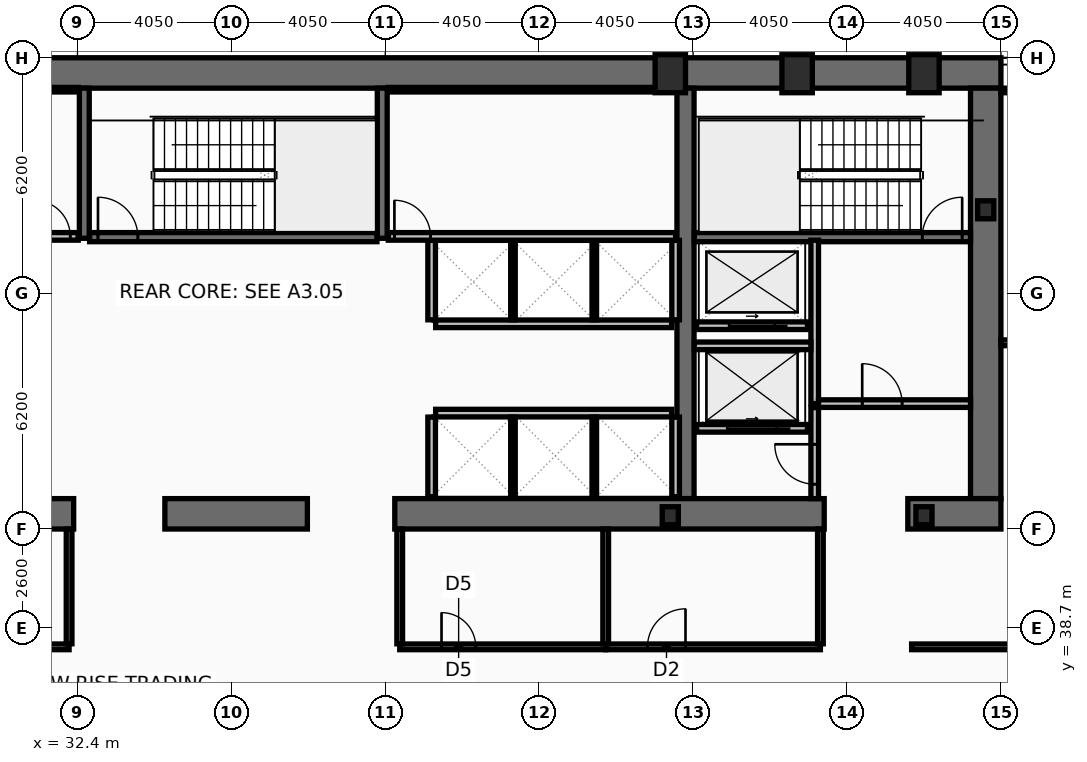
"""IFC4 building model, lengths in metres.
Left out: names, types, materials, properties, quantities, classifications, styles, units other than length and angle.
Written with IfcOpenShell. Run it as: python <this file> out.ifc"""

import sys

from ifc_helpers import new_model, si_unit, direction, frame, frame_2d, origin, origin_2d, place, context, subcontext, project, spatial, rectangle, hollow_rectangle, i_section, extrude, element, fill, save


model = new_model("IFC4")
c1 = context("Model", 3, precision=1e-05, world=origin(), true_north=direction((0.0, 1.0)))
c2 = subcontext(c1, "Body", "Model", "MODEL_VIEW")
j1 = project(units=[si_unit("LENGTHUNIT", "METRE"), si_unit("PLANEANGLEUNIT", "RADIAN")], contexts=[c1])
p1 = place(None, origin())
s1 = spatial("IfcSite", under=j1, at=p1, CompositionType="ELEMENT")
p2 = place(p1, origin())
s2 = spatial("IfcBuilding", under=s1, at=p2, CompositionType="ELEMENT")
p3 = place(p2, frame((0.0, 0.0, 49.8)))
s3 = spatial("IfcBuildingStorey", under=s2, at=p3, CompositionType="ELEMENT", Elevation=49.8)
p4 = place(p3, frame((16.2, 53.3, 0.0), z_axis=(0.0, 0.0, 1.0), x_axis=(1.0, 0.0, 0.0)))
e1 = element("IfcWall", 1, at=p4, inside=s3, PredefinedType="SHEAR", context=c2, shape_type="SweptSolid", body=[
    extrude(rectangle(XDim=40.5, YDim=0.8, at=frame_2d((20.25, 0.0))), origin(), (0.0, 0.0, 1.0), 3.82),
])
p5 = place(p3, frame((56.3, 52.9, 0.0), z_axis=(0.0, 0.0, 1.0), x_axis=(0.0, -1.0, 0.0)))
e2 = element("IfcWall", 2, at=p5, inside=s3, PredefinedType="SHEAR", context=c2, shape_type="SweptSolid", body=[
    extrude(rectangle(XDim=10.8, YDim=0.8, at=frame_2d((5.4, 0.0))), origin(), (0.0, 0.0, 1.0), 3.82),
])
p6 = place(p3, frame((48.4, 42.1, 0.0), z_axis=(0.0, 0.0, 1.0), x_axis=(0.0, 1.0, 0.0)))
e3 = element("IfcWall", 3, at=p6, inside=s3, PredefinedType="SHEAR", context=c2, shape_type="SweptSolid", body=[
    extrude(rectangle(XDim=10.8, YDim=0.45, at=frame_2d((5.4, 0.0))), origin(), (0.0, 0.0, 1.0), 3.82),
])
p7 = place(p3, frame((32.3, 41.7, 0.0), z_axis=(0.0, 0.0, 1.0), x_axis=(-1.0, 0.0, 0.0)))
e4 = element("IfcWall", 4, at=p7, inside=s3, PredefinedType="SHEAR", context=c2, shape_type="SweptSolid", body=[
    extrude(rectangle(XDim=11.45, YDim=0.8, at=frame_2d((5.725, 0.0))), origin(), (0.0, 0.0, 1.0), 3.82),
])
p8 = place(p3, frame((38.45, 41.7, 0.0), z_axis=(0.0, 0.0, 1.0), x_axis=(-1.0, 0.0, 0.0)))
e5 = element("IfcWall", 5, at=p8, inside=s3, PredefinedType="SHEAR", context=c2, shape_type="SweptSolid", body=[
    extrude(rectangle(XDim=3.75, YDim=0.8, at=frame_2d((1.875, 0.0))), origin(), (0.0, 0.0, 1.0), 3.82),
])
p9 = place(p3, frame((52.05, 41.7, 0.0), z_axis=(0.0, 0.0, 1.0), x_axis=(-1.0, 0.0, 0.0)))
e6 = element("IfcWall", 6, at=p9, inside=s3, PredefinedType="SHEAR", context=c2, shape_type="SweptSolid", body=[
    extrude(rectangle(XDim=11.3, YDim=0.8, at=frame_2d((5.65, 0.0))), origin(), (0.0, 0.0, 1.0), 3.82),
])
p10 = place(p3, frame((56.7, 41.7, 0.0), z_axis=(0.0, 0.0, 1.0), x_axis=(-1.0, 0.0, 0.0)))
e7 = element("IfcWall", 7, at=p10, inside=s3, PredefinedType="SHEAR", context=c2, shape_type="SweptSolid", body=[
    extrude(rectangle(XDim=2.45, YDim=0.8, at=frame_2d((1.225, 0.0))), origin(), (0.0, 0.0, 1.0), 3.82),
])
for number, where, z_axis, x_axis in (
    (8, (32.58, 48.95, 0.0), (0.0, 0.0, 1.0), (0.0, 1.0, 0.0)),
    (9, (40.42, 48.95, 0.0), (0.0, 0.0, 1.0), (0.0, 1.0, 0.0)),
):
    element("IfcWall", number, at=place(p3, frame(where, z_axis=z_axis, x_axis=x_axis)), inside=s3, PredefinedType="SHEAR", context=c2, shape_type="SweptSolid", body=[
        extrude(rectangle(XDim=3.95, YDim=0.26, at=frame_2d((1.975, 0.0))), origin(), (0.0, 0.0, 1.0), 3.82),
    ])
p11 = place(p3, frame((48.63, 48.98, 0.0), z_axis=(0.0, 0.0, 1.0), x_axis=(1.0, 0.0, 0.0)))
e10 = element("IfcWall", 10, at=p11, inside=s3, PredefinedType="SHEAR", context=c2, shape_type="SweptSolid", body=[
    extrude(rectangle(XDim=7.27, YDim=0.24, at=frame_2d((3.635, 0.0))), origin(), (0.0, 0.0, 1.0), 3.82),
])
p12 = place(p11, frame((6.0, 0.0, 0.0)))
e11 = element("IfcOpeningElement", 11, at=p12, cuts=e10, PredefinedType="OPENING", context=c2, shape_type="SweptSolid", body=[
    extrude(rectangle(XDim=1.05, YDim=2.15, at=frame_2d((0.525, 1.075))), frame((0.0, 0.13, 0.0), z_axis=(0.0, -1.0, 0.0), x_axis=(1.0, 0.0, 0.0)), (0.0, 0.0, 1.0), 0.26),
])
p13 = place(p3, frame((32.72, 48.98, 0.0), z_axis=(0.0, 0.0, 1.0), x_axis=(1.0, 0.0, 0.0)))
e12 = element("IfcWall", 12, at=p13, inside=s3, PredefinedType="SHEAR", context=c2, shape_type="SweptSolid", body=[
    extrude(rectangle(XDim=7.56, YDim=0.24, at=frame_2d((3.78, 0.0))), origin(), (0.0, 0.0, 1.0), 3.82),
])
p14 = place(p13, frame((0.22, 0.0, 0.0)))
e13 = element("IfcOpeningElement", 13, at=p14, cuts=e12, PredefinedType="OPENING", context=c2, shape_type="SweptSolid", body=[
    extrude(rectangle(XDim=1.05, YDim=2.15, at=frame_2d((0.525, 1.075))), frame((0.0, 0.13, 0.0), z_axis=(0.0, -1.0, 0.0), x_axis=(1.0, 0.0, 0.0)), (0.0, 0.0, 1.0), 0.26),
])
for number, where, z_axis, x_axis in (
    (14, (48.0, 53.28, 0.0), (0.0, 0.0, 1.0), (1.0, 0.0, 0.0)),
    (15, (51.337, 53.28, 0.0), (0.0, 0.0, 1.0), (1.0, 0.0, 0.0)),
    (16, (54.675, 53.28, 0.0), (0.0, 0.0, 1.0), (1.0, 0.0, 0.0)),
):
    element("IfcColumn", number, at=place(p3, frame(where, z_axis=z_axis, x_axis=x_axis)), inside=s3, PredefinedType="COLUMN", context=c2, shape_type="SweptSolid", body=[
        extrude(hollow_rectangle(XDim=0.8, YDim=1.0, WallThickness=0.055, at=origin_2d()), origin(), (0.0, 0.0, 1.0), 4.0),
    ])
for number, where, z_axis, x_axis in (
    (17, (56.3, 49.7, 0.0), (0.0, 0.0, 1.0), (1.0, 0.0, 0.0)),
    (18, (48.0, 41.65, 0.0), (0.0, 0.0, 1.0), (1.0, 0.0, 0.0)),
    (19, (54.675, 41.65, 0.0), (0.0, 0.0, 1.0), (1.0, 0.0, 0.0)),
):
    element("IfcColumn", number, at=place(p3, frame(where, z_axis=z_axis, x_axis=x_axis)), inside=s3, PredefinedType="COLUMN", context=c2, shape_type="SweptSolid", body=[
        extrude(i_section(OverallWidth=0.424, OverallDepth=0.474, WebThickness=0.048, FlangeThickness=0.077, at=origin_2d()), origin(), (0.0, 0.0, 1.0), 4.0),
    ])
p15 = place(p3, frame((51.61, 43.95, 0.0), z_axis=(0.0, 0.0, 1.0), x_axis=(-1.0, 0.0, 0.0)))
e20 = element("IfcWall", 20, at=p15, inside=s3, PredefinedType="PARTITIONING", context=c2, shape_type="SweptSolid", body=[
    extrude(rectangle(XDim=2.92, YDim=0.2, at=frame_2d((1.46, 0.0))), origin(), (0.0, 0.0, 1.0), 3.82),
])
p16 = place(p15, frame((0.81, 0.0, 0.0)))
e21 = element("IfcOpeningElement", 21, at=p16, cuts=e20, PredefinedType="OPENING", context=c2, shape_type="SweptSolid", body=[
    extrude(rectangle(XDim=1.3, YDim=2.18, at=frame_2d((0.65, 1.09))), frame((0.0, 0.11, 0.0), z_axis=(0.0, -1.0, 0.0), x_axis=(1.0, 0.0, 0.0)), (0.0, 0.0, 1.0), 0.22),
])
p17 = place(p3, frame((51.61, 46.65, 0.0), z_axis=(0.0, 0.0, 1.0), x_axis=(-1.0, 0.0, 0.0)))
e22 = element("IfcWall", 22, at=p17, inside=s3, PredefinedType="PARTITIONING", context=c2, shape_type="SweptSolid", body=[
    extrude(rectangle(XDim=2.92, YDim=0.2, at=frame_2d((1.46, 0.0))), origin(), (0.0, 0.0, 1.0), 3.82),
])
p18 = place(p17, frame((0.86, 0.0, 0.0)))
e23 = element("IfcOpeningElement", 23, at=p18, cuts=e22, PredefinedType="OPENING", context=c2, shape_type="SweptSolid", body=[
    extrude(rectangle(XDim=1.2, YDim=2.18, at=frame_2d((0.6, 1.09))), frame((0.0, 0.11, 0.0), z_axis=(0.0, -1.0, 0.0), x_axis=(1.0, 0.0, 0.0)), (0.0, 0.0, 1.0), 0.22),
])
p19 = place(p3, frame((51.8, 44.6, 0.0), z_axis=(0.0, 0.0, 1.0), x_axis=(0.0, 1.0, 0.0)))
e24 = element("IfcWall", 24, at=p19, inside=s3, PredefinedType="PARTITIONING", context=c2, shape_type="SweptSolid", body=[
    extrude(rectangle(XDim=4.3, YDim=0.2, at=frame_2d((2.15, 0.0))), origin(), (0.0, 0.0, 1.0), 3.82),
])
p20 = place(p3, frame((51.9, 44.6, 0.0), z_axis=(0.0, 0.0, 1.0), x_axis=(1.0, 0.0, 0.0)))
e25 = element("IfcWall", 25, at=p20, inside=s3, PredefinedType="PARTITIONING", context=c2, shape_type="SweptSolid", body=[
    extrude(rectangle(XDim=4.0, YDim=0.2, at=frame_2d((2.0, 0.0))), origin(), (0.0, 0.0, 1.0), 3.82),
])
p21 = place(p20, frame((1.15, 0.0, 0.0)))
e26 = element("IfcOpeningElement", 26, at=p21, cuts=e25, PredefinedType="OPENING", context=c2, shape_type="SweptSolid", body=[
    extrude(rectangle(XDim=1.05, YDim=2.15, at=frame_2d((0.525, 1.075))), frame((0.0, 0.11, 0.0), z_axis=(0.0, -1.0, 0.0), x_axis=(1.0, 0.0, 0.0)), (0.0, 0.0, 1.0), 0.22),
])
p22 = place(p3, frame((48.63, 46.12, 0.0), z_axis=(0.0, 0.0, 1.0), x_axis=(1.0, 0.0, 0.0)))
e27 = element("IfcWall", 27, at=p22, inside=s3, PredefinedType="PARTITIONING", context=c2, shape_type="SweptSolid", body=[
    extrude(rectangle(XDim=3.07, YDim=0.2, at=frame_2d((1.535, 0.0))), origin(), (0.0, 0.0, 1.0), 3.82),
])
p23 = place(p3, frame((51.8, 42.1, 0.0), z_axis=(0.0, 0.0, 1.0), x_axis=(0.0, 1.0, 0.0)))
e28 = element("IfcWall", 28, at=p23, inside=s3, PredefinedType="PARTITIONING", context=c2, shape_type="SweptSolid", body=[
    extrude(rectangle(XDim=2.395, YDim=0.2, at=frame_2d((1.198, 0.0))), origin(), (0.0, 0.0, 1.0), 3.82),
])
p24 = place(p23, frame((0.38, 0.0, 0.0)))
e29 = element("IfcOpeningElement", 29, at=p24, cuts=e28, PredefinedType="OPENING", context=c2, shape_type="SweptSolid", body=[
    extrude(rectangle(XDim=1.05, YDim=2.15, at=frame_2d((0.525, 1.075))), frame((0.0, 0.11, 0.0), z_axis=(0.0, -1.0, 0.0), x_axis=(1.0, 0.0, 0.0)), (0.0, 0.0, 1.0), 0.22),
])
p25 = place(p3, frame((41.825, 46.7, 0.0), z_axis=(0.0, 0.0, 1.0), x_axis=(1.0, 0.0, 0.0)))
e30 = element("IfcWall", 30, at=p25, inside=s3, PredefinedType="PARTITIONING", context=c2, shape_type="SweptSolid", body=[
    extrude(rectangle(XDim=6.21, YDim=0.2, at=frame_2d((3.105, 0.0))), origin(), (0.0, 0.0, 1.0), 3.82),
])
for number, where, z_axis, x_axis in (
    (31, (41.72, 46.805, 0.0), (0.0, 0.0, 1.0), (0.0, 1.0, 0.0)),
    (32, (48.14, 46.805, 0.0), (0.0, 0.0, 1.0), (0.0, 1.0, 0.0)),
):
    element("IfcWall", number, at=place(p3, frame(where, z_axis=z_axis, x_axis=x_axis)), inside=s3, PredefinedType="PARTITIONING", context=c2, shape_type="SweptSolid", body=[
        extrude(rectangle(XDim=2.09, YDim=0.2, at=frame_2d((1.045, 0.0))), origin(), (0.0, 0.0, 1.0), 3.82),
    ])
for number, where, z_axis, x_axis in (
    (33, (43.86, 46.805, 0.0), (0.0, 0.0, 1.0), (0.0, 1.0, 0.0)),
    (34, (46.0, 46.805, 0.0), (0.0, 0.0, 1.0), (0.0, 1.0, 0.0)),
):
    element("IfcWall", number, at=place(p3, frame(where, z_axis=z_axis, x_axis=x_axis)), inside=s3, PredefinedType="PARTITIONING", context=c2, shape_type="SweptSolid", body=[
        extrude(rectangle(XDim=2.09, YDim=0.12, at=frame_2d((1.045, 0.0))), origin(), (0.0, 0.0, 1.0), 3.82),
    ])
p26 = place(p3, frame((41.825, 44.35, 0.0), z_axis=(0.0, 0.0, 1.0), x_axis=(1.0, 0.0, 0.0)))
e35 = element("IfcWall", 35, at=p26, inside=s3, PredefinedType="PARTITIONING", context=c2, shape_type="SweptSolid", body=[
    extrude(rectangle(XDim=6.21, YDim=0.2, at=frame_2d((3.105, 0.0))), origin(), (0.0, 0.0, 1.0), 3.82),
])
for number, where, z_axis, x_axis in (
    (36, (41.72, 42.15, 0.0), (0.0, 0.0, 1.0), (0.0, 1.0, 0.0)),
    (37, (48.14, 42.15, 0.0), (0.0, 0.0, 1.0), (0.0, 1.0, 0.0)),
):
    element("IfcWall", number, at=place(p3, frame(where, z_axis=z_axis, x_axis=x_axis)), inside=s3, PredefinedType="PARTITIONING", context=c2, shape_type="SweptSolid", body=[
        extrude(rectangle(XDim=2.095, YDim=0.2, at=frame_2d((1.048, 0.0))), origin(), (0.0, 0.0, 1.0), 3.82),
    ])
for number, where, z_axis, x_axis in (
    (38, (43.86, 42.15, 0.0), (0.0, 0.0, 1.0), (0.0, 1.0, 0.0)),
    (39, (46.0, 42.15, 0.0), (0.0, 0.0, 1.0), (0.0, 1.0, 0.0)),
):
    element("IfcWall", number, at=place(p3, frame(where, z_axis=z_axis, x_axis=x_axis)), inside=s3, PredefinedType="PARTITIONING", context=c2, shape_type="SweptSolid", body=[
        extrude(rectangle(XDim=2.095, YDim=0.12, at=frame_2d((1.048, 0.0))), origin(), (0.0, 0.0, 1.0), 3.82),
    ])
p27 = place(p3, frame((24.7, 52.86, 0.0), z_axis=(0.0, 0.0, 1.0), x_axis=(1.0, 0.0, 0.0)))
e40 = element("IfcWall", 40, at=p27, inside=s3, PredefinedType="PARTITIONING", context=c2, shape_type="SweptSolid", body=[
    extrude(rectangle(XDim=7.72, YDim=0.12, at=frame_2d((3.86, 0.0))), origin(), (0.0, 0.0, 1.0), 3.82),
])
p28 = place(p3, frame((24.7, 49.0, 0.0), z_axis=(0.0, 0.0, 1.0), x_axis=(1.0, 0.0, 0.0)))
e41 = element("IfcWall", 41, at=p28, inside=s3, PredefinedType="PARTITIONING", context=c2, shape_type="SweptSolid", body=[
    extrude(rectangle(XDim=7.72, YDim=0.2, at=frame_2d((3.86, 0.0))), origin(), (0.0, 0.0, 1.0), 3.82),
])
p29 = place(p28, frame((6.56, 0.0, 0.0)))
e42 = element("IfcOpeningElement", 42, at=p29, cuts=e41, PredefinedType="OPENING", context=c2, shape_type="SweptSolid", body=[
    extrude(rectangle(XDim=0.95, YDim=2.1, at=frame_2d((0.475, 1.05))), frame((0.0, 0.11, 0.0), z_axis=(0.0, -1.0, 0.0), x_axis=(1.0, 0.0, 0.0)), (0.0, 0.0, 1.0), 0.22),
])
p30 = place(p3, frame((40.58, 52.86, 0.0), z_axis=(0.0, 0.0, 1.0), x_axis=(1.0, 0.0, 0.0)))
e43 = element("IfcWall", 43, at=p30, inside=s3, PredefinedType="PARTITIONING", context=c2, shape_type="SweptSolid", body=[
    extrude(rectangle(XDim=7.56, YDim=0.12, at=frame_2d((3.78, 0.0))), origin(), (0.0, 0.0, 1.0), 3.82),
])
p31 = place(p3, frame((40.58, 49.0, 0.0), z_axis=(0.0, 0.0, 1.0), x_axis=(1.0, 0.0, 0.0)))
e44 = element("IfcWall", 44, at=p31, inside=s3, PredefinedType="PARTITIONING", context=c2, shape_type="SweptSolid", body=[
    extrude(rectangle(XDim=7.56, YDim=0.2, at=frame_2d((3.78, 0.0))), origin(), (0.0, 0.0, 1.0), 3.82),
])
p32 = place(p31, frame((0.16, 0.0, 0.0)))
e45 = element("IfcOpeningElement", 45, at=p32, cuts=e44, PredefinedType="OPENING", context=c2, shape_type="SweptSolid", body=[
    extrude(rectangle(XDim=0.95, YDim=2.1, at=frame_2d((0.475, 1.05))), frame((0.0, 0.11, 0.0), z_axis=(0.0, -1.0, 0.0), x_axis=(1.0, 0.0, 0.0)), (0.0, 0.0, 1.0), 0.22),
])
p33 = place(p3, frame((28.8, 38.2, 0.0), z_axis=(0.0, 0.0, 1.0), x_axis=(1.0, 0.0, 0.0)))
e46 = element("IfcWall", 46, at=p33, inside=s3, PredefinedType="PARTITIONING", context=c2, shape_type="SweptSolid", body=[
    extrude(rectangle(XDim=3.38, YDim=0.15, at=frame_2d((1.69, 0.0))), origin(), (0.0, 0.0, 1.0), 3.01),
])
p34 = place(p33, frame((0.7, 0.0, 0.0)))
e47 = element("IfcOpeningElement", 47, at=p34, cuts=e46, PredefinedType="OPENING", context=c2, shape_type="SweptSolid", body=[
    extrude(rectangle(XDim=0.95, YDim=2.05, at=frame_2d((0.475, 1.025))), frame((0.0, 0.085, 0.0), z_axis=(0.0, -1.0, 0.0), x_axis=(1.0, 0.0, 0.0)), (0.0, 0.0, 1.0), 0.17),
])
p35 = place(p3, frame((32.18, 38.28, 0.0), z_axis=(0.0, 0.0, 1.0), x_axis=(0.0, 1.0, 0.0)))
e48 = element("IfcWall", 48, at=p35, inside=s3, PredefinedType="PARTITIONING", context=c2, shape_type="SweptSolid", body=[
    extrude(rectangle(XDim=3.02, YDim=0.15, at=frame_2d((1.51, 0.0))), origin(), (0.0, 0.0, 1.0), 3.82),
])
p36 = place(p3, frame((40.88, 38.2, 0.0), z_axis=(0.0, 0.0, 1.0), x_axis=(1.0, 0.0, 0.0)))
e49 = element("IfcWall", 49, at=p36, inside=s3, PredefinedType="PARTITIONING", context=c2, shape_type="SweptSolid", body=[
    extrude(rectangle(XDim=5.42, YDim=0.15, at=frame_2d((2.71, 0.0))), origin(), (0.0, 0.0, 1.0), 3.01),
])
p37 = place(p36, frame((1.1, 0.0, 0.0)))
e50 = element("IfcOpeningElement", 50, at=p37, cuts=e49, PredefinedType="OPENING", context=c2, shape_type="SweptSolid", body=[
    extrude(rectangle(XDim=0.9, YDim=2.05, at=frame_2d((0.45, 1.025))), frame((0.0, 0.085, 0.0), z_axis=(0.0, -1.0, 0.0), x_axis=(1.0, 0.0, 0.0)), (0.0, 0.0, 1.0), 0.17),
])
p38 = place(p3, frame((46.3, 38.2, 0.0), z_axis=(0.0, 0.0, 1.0), x_axis=(1.0, 0.0, 0.0)))
e51 = element("IfcWall", 51, at=p38, inside=s3, PredefinedType="PARTITIONING", context=c2, shape_type="SweptSolid", body=[
    extrude(rectangle(XDim=5.65, YDim=0.15, at=frame_2d((2.825, 0.0))), origin(), (0.0, 0.0, 1.0), 3.01),
])
p39 = place(p38, frame((1.1, 0.0, 0.0)))
e52 = element("IfcOpeningElement", 52, at=p39, cuts=e51, PredefinedType="OPENING", context=c2, shape_type="SweptSolid", body=[
    extrude(rectangle(XDim=1.0, YDim=2.05, at=frame_2d((0.5, 1.025))), frame((0.0, 0.085, 0.0), z_axis=(0.0, -1.0, 0.0), x_axis=(1.0, 0.0, 0.0)), (0.0, 0.0, 1.0), 0.17),
])
for number, where, z_axis, x_axis in (
    (53, (40.88, 38.28, 0.0), (0.0, 0.0, 1.0), (0.0, 1.0, 0.0)),
    (54, (46.3, 38.28, 0.0), (0.0, 0.0, 1.0), (0.0, 1.0, 0.0)),
    (55, (51.95, 38.28, 0.0), (0.0, 0.0, 1.0), (0.0, 1.0, 0.0)),
):
    element("IfcWall", number, at=place(p3, frame(where, z_axis=z_axis, x_axis=x_axis)), inside=s3, PredefinedType="PARTITIONING", context=c2, shape_type="SweptSolid", body=[
        extrude(rectangle(XDim=3.02, YDim=0.15, at=frame_2d((1.51, 0.0))), origin(), (0.0, 0.0, 1.0), 3.82),
    ])
p40 = place(p3, frame((54.35, 38.2, 0.0), z_axis=(0.0, 0.0, 1.0), x_axis=(1.0, 0.0, 0.0)))
e56 = element("IfcWall", 56, at=p40, inside=s3, PredefinedType="PARTITIONING", context=c2, shape_type="SweptSolid", body=[
    extrude(rectangle(XDim=16.52, YDim=0.15, at=frame_2d((8.26, 0.0))), origin(), (0.0, 0.0, 1.0), 3.01),
])
p41 = place(p40, frame((3.25, 0.0, 0.0)))
e57 = element("IfcOpeningElement", 57, at=p41, cuts=e56, PredefinedType="OPENING", context=c2, shape_type="SweptSolid", body=[
    extrude(rectangle(XDim=0.95, YDim=2.05, at=frame_2d((0.475, 1.025))), frame((0.0, 0.085, 0.0), z_axis=(0.0, -1.0, 0.0), x_axis=(1.0, 0.0, 0.0)), (0.0, 0.0, 1.0), 0.17),
])
p42 = place(p3, frame((56.7, 46.2, 0.0), z_axis=(0.0, 0.0, 1.0), x_axis=(1.0, 0.0, 0.0)))
e58 = element("IfcWall", 58, at=p42, inside=s3, PredefinedType="PARTITIONING", context=c2, shape_type="SweptSolid", body=[
    extrude(rectangle(XDim=14.105, YDim=0.15, at=frame_2d((7.052, 0.0))), origin(), (0.0, 0.0, 1.0), 3.16),
])
p43 = place(p42, frame((0.9, 0.0, 0.0)))
e59 = element("IfcOpeningElement", 59, at=p43, cuts=e58, PredefinedType="OPENING", context=c2, shape_type="SweptSolid", body=[
    extrude(rectangle(XDim=0.9, YDim=2.05, at=frame_2d((0.45, 1.025))), frame((0.0, 0.085, 0.0), z_axis=(0.0, -1.0, 0.0), x_axis=(1.0, 0.0, 0.0)), (0.0, 0.0, 1.0), 0.17),
])
p44 = place(p3, frame((56.7, 52.84, 0.0), z_axis=(0.0, 0.0, 1.0), x_axis=(1.0, 0.0, 0.0)))
e60 = element("IfcWall", 60, at=p44, inside=s3, PredefinedType="PARTITIONING", context=c2, shape_type="SweptSolid", body=[
    extrude(rectangle(XDim=14.105, YDim=0.12, at=frame_2d((7.052, 0.0))), origin(), (0.0, 0.0, 1.0), 3.82),
])
p45 = place(p12, origin())
e61 = element("IfcDoor", 61, at=p45, inside=s3, OperationType="SINGLE_SWING_RIGHT", PredefinedType="DOOR", context=c2, shape_type="SweptSolid", body=[
    extrude(rectangle(XDim=1.05, YDim=2.15, at=frame_2d((0.525, 1.075))), frame((0.0, 0.025, 0.0), z_axis=(0.0, -1.0, 0.0), x_axis=(1.0, 0.0, 0.0)), (0.0, 0.0, 1.0), 0.05),
])
fill(e11, e61)
p46 = place(p14, origin())
e62 = element("IfcDoor", 62, at=p46, inside=s3, OperationType="SINGLE_SWING_LEFT", PredefinedType="DOOR", context=c2, shape_type="SweptSolid", body=[
    extrude(rectangle(XDim=1.05, YDim=2.15, at=frame_2d((0.525, 1.075))), frame((0.0, 0.025, 0.0), z_axis=(0.0, -1.0, 0.0), x_axis=(1.0, 0.0, 0.0)), (0.0, 0.0, 1.0), 0.05),
])
fill(e13, e62)
p47 = place(p16, origin())
e63 = element("IfcDoor", 63, at=p47, inside=s3, OperationType="SLIDING_TO_LEFT", PredefinedType="DOOR", context=c2, shape_type="SweptSolid", body=[
    extrude(rectangle(XDim=1.3, YDim=2.18, at=frame_2d((0.65, 1.09))), frame((0.0, 0.025, 0.0), z_axis=(0.0, -1.0, 0.0), x_axis=(1.0, 0.0, 0.0)), (0.0, 0.0, 1.0), 0.05),
])
fill(e21, e63)
p48 = place(p18, origin())
e64 = element("IfcDoor", 64, at=p48, inside=s3, OperationType="SLIDING_TO_LEFT", PredefinedType="DOOR", context=c2, shape_type="SweptSolid", body=[
    extrude(rectangle(XDim=1.2, YDim=2.18, at=frame_2d((0.6, 1.09))), frame((0.0, 0.025, 0.0), z_axis=(0.0, -1.0, 0.0), x_axis=(1.0, 0.0, 0.0)), (0.0, 0.0, 1.0), 0.05),
])
fill(e23, e64)
p49 = place(p21, origin())
e65 = element("IfcDoor", 65, at=p49, inside=s3, OperationType="SINGLE_SWING_LEFT", PredefinedType="DOOR", context=c2, shape_type="SweptSolid", body=[
    extrude(rectangle(XDim=1.05, YDim=2.15, at=frame_2d((0.525, 1.075))), frame((0.0, 0.025, 0.0), z_axis=(0.0, -1.0, 0.0), x_axis=(1.0, 0.0, 0.0)), (0.0, 0.0, 1.0), 0.05),
])
fill(e26, e65)
p50 = place(p24, origin())
e66 = element("IfcDoor", 66, at=p50, inside=s3, OperationType="SINGLE_SWING_RIGHT", PredefinedType="DOOR", context=c2, shape_type="SweptSolid", body=[
    extrude(rectangle(XDim=1.05, YDim=2.15, at=frame_2d((0.525, 1.075))), frame((0.0, 0.025, 0.0), z_axis=(0.0, -1.0, 0.0), x_axis=(1.0, 0.0, 0.0)), (0.0, 0.0, 1.0), 0.05),
])
fill(e29, e66)
p51 = place(p29, origin())
e67 = element("IfcDoor", 67, at=p51, inside=s3, OperationType="SINGLE_SWING_LEFT", PredefinedType="DOOR", context=c2, shape_type="SweptSolid", body=[
    extrude(rectangle(XDim=0.95, YDim=2.1, at=frame_2d((0.475, 1.05))), frame((0.0, 0.025, 0.0), z_axis=(0.0, -1.0, 0.0), x_axis=(1.0, 0.0, 0.0)), (0.0, 0.0, 1.0), 0.05),
])
fill(e42, e67)
p52 = place(p32, origin())
e68 = element("IfcDoor", 68, at=p52, inside=s3, OperationType="SINGLE_SWING_LEFT", PredefinedType="DOOR", context=c2, shape_type="SweptSolid", body=[
    extrude(rectangle(XDim=0.95, YDim=2.1, at=frame_2d((0.475, 1.05))), frame((0.0, 0.025, 0.0), z_axis=(0.0, -1.0, 0.0), x_axis=(1.0, 0.0, 0.0)), (0.0, 0.0, 1.0), 0.05),
])
fill(e45, e68)
p53 = place(p37, origin())
e69 = element("IfcDoor", 69, at=p53, inside=s3, OperationType="SINGLE_SWING_LEFT", PredefinedType="DOOR", context=c2, shape_type="SweptSolid", body=[
    extrude(rectangle(XDim=0.9, YDim=2.05, at=frame_2d((0.45, 1.025))), frame((0.0, 0.025, 0.0), z_axis=(0.0, -1.0, 0.0), x_axis=(1.0, 0.0, 0.0)), (0.0, 0.0, 1.0), 0.05),
])
fill(e50, e69)
p54 = place(p39, origin())
e70 = element("IfcDoor", 70, at=p54, inside=s3, OperationType="SINGLE_SWING_RIGHT", PredefinedType="DOOR", context=c2, shape_type="SweptSolid", body=[
    extrude(rectangle(XDim=1.0, YDim=2.05, at=frame_2d((0.5, 1.025))), frame((0.0, 0.025, 0.0), z_axis=(0.0, -1.0, 0.0), x_axis=(1.0, 0.0, 0.0)), (0.0, 0.0, 1.0), 0.05),
])
fill(e52, e70)
save(model, sys.argv[1])
